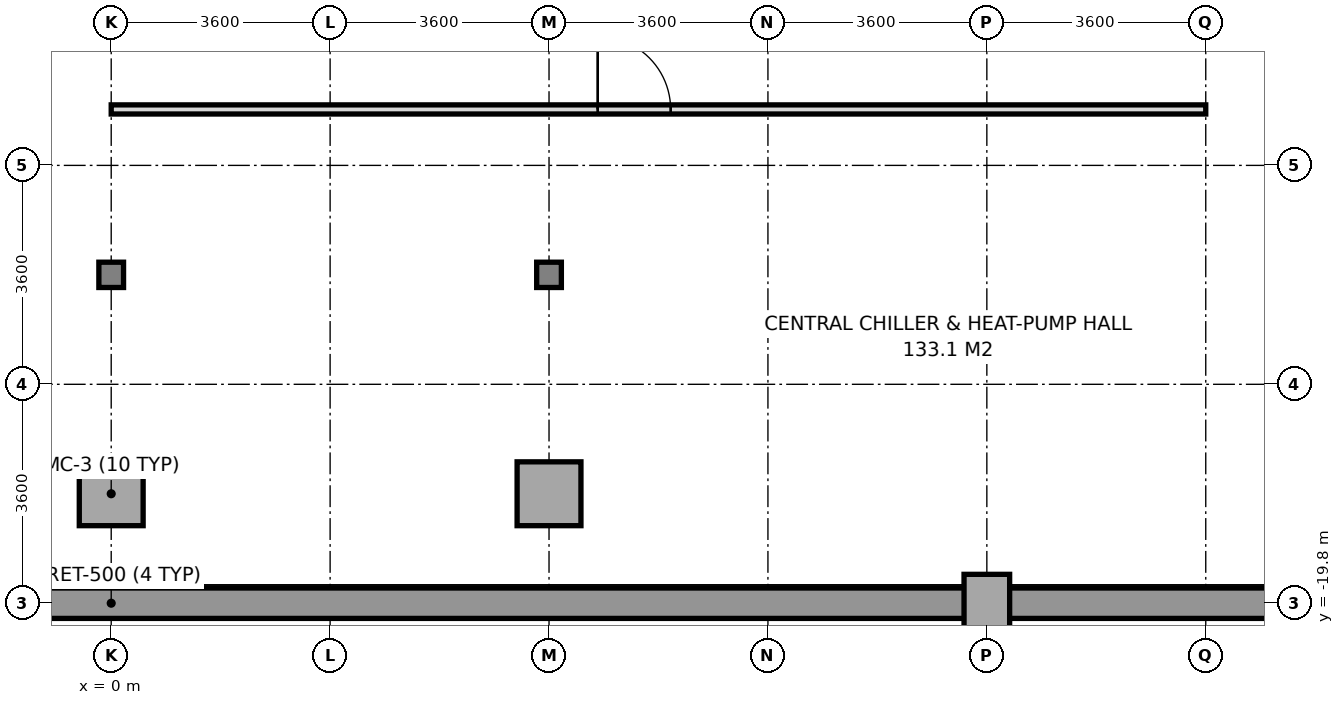
"""IFC4 building model, lengths in metres.
Left out: names, types, materials, properties, quantities, classifications, styles, units other than length and angle.
Written with IfcOpenShell. Run it as: python <this file> out.ifc"""

import sys

from ifc_helpers import new_model, si_unit, direction, frame, frame_2d, origin, origin_2d, place, context, subcontext, project, spatial, rectangle, i_section, extrude, source, transform, mapped, element, fill, save


model = new_model("IFC4")
c1 = context("Model", 3, precision=1e-05, world=origin(), true_north=direction((0.0, 1.0)))
c2 = subcontext(c1, "Body", "Model", "MODEL_VIEW")
j1 = project(units=[si_unit("LENGTHUNIT", "METRE"), si_unit("PLANEANGLEUNIT", "RADIAN")], contexts=[c1])
p1 = place(None, origin())
s1 = spatial("IfcSite", under=j1, at=p1, CompositionType="ELEMENT")
p2 = place(p1, origin())
s2 = spatial("IfcBuilding", under=s1, at=p2, CompositionType="ELEMENT")
p3 = place(p2, frame((0.0, 0.0, -8.4)))
s3 = spatial("IfcBuildingStorey", under=s2, at=p3, CompositionType="ELEMENT", Elevation=-8.4)
m1 = source(origin(), c2, "Body", "SweptSolid", [
    extrude(rectangle(XDim=1.05, YDim=1.05, at=origin_2d()), origin(), (0.0, 0.0, 1.0), 4.12),
])
p4 = place(p3, frame((0.0, -18.0, -0.2), z_axis=(0.0, 0.0, 1.0), x_axis=(1.0, 0.0, 0.0)))
e1 = element("IfcColumn", 1, at=p4, inside=s3, PredefinedType="COLUMN", context=c2, shape_type="MappedRepresentation", body=[
    mapped(m1, transform((0.0, 0.0, 0.0), x_axis=(1.0, 0.0, 0.0), y_axis=(0.0, 1.0, 0.0), z_axis=(0.0, 0.0, 1.0), scale=1.0)),
])
m2 = source(origin(), c2, "Body", "SweptSolid", [
    extrude(i_section(OverallWidth=0.406, OverallDepth=0.416, WebThickness=0.024, FlangeThickness=0.039, at=origin_2d()), origin(), (0.0, 0.0, 1.0), 4.12),
])
p5 = place(p3, frame((0.0, -14.4, -0.2), z_axis=(0.0, 0.0, 1.0), x_axis=(1.0, 0.0, 0.0)))
e2 = element("IfcColumn", 2, at=p5, inside=s3, PredefinedType="COLUMN", context=c2, shape_type="MappedRepresentation", body=[
    mapped(m2, transform((0.0, 0.0, 0.0), x_axis=(1.0, 0.0, 0.0), y_axis=(0.0, 1.0, 0.0), z_axis=(0.0, 0.0, 1.0), scale=1.0)),
])
p6 = place(p3, frame((7.2, -18.0, -0.2), z_axis=(0.0, 0.0, 1.0), x_axis=(1.0, 0.0, 0.0)))
e3 = element("IfcColumn", 3, at=p6, inside=s3, PredefinedType="COLUMN", context=c2, shape_type="MappedRepresentation", body=[
    mapped(m1, transform((0.0, 0.0, 0.0), x_axis=(1.0, 0.0, 0.0), y_axis=(0.0, 1.0, 0.0), z_axis=(0.0, 0.0, 1.0), scale=1.0)),
])
p7 = place(p3, frame((7.2, -14.4, -0.2), z_axis=(0.0, 0.0, 1.0), x_axis=(1.0, 0.0, 0.0)))
e4 = element("IfcColumn", 4, at=p7, inside=s3, PredefinedType="COLUMN", context=c2, shape_type="MappedRepresentation", body=[
    mapped(m2, transform((0.0, 0.0, 0.0), x_axis=(1.0, 0.0, 0.0), y_axis=(0.0, 1.0, 0.0), z_axis=(0.0, 0.0, 1.0), scale=1.0)),
])
m3 = source(origin(), c2, "Body", "SweptSolid", [
    extrude(rectangle(XDim=0.75, YDim=0.95, at=origin_2d()), origin(), (0.0, 0.0, 1.0), 4.12),
])
p8 = place(p3, frame((14.4, -19.8, -0.2), z_axis=(0.0, 0.0, 1.0), x_axis=(1.0, 0.0, 0.0)))
e5 = element("IfcColumn", 5, at=p8, inside=s3, PredefinedType="COLUMN", context=c2, shape_type="MappedRepresentation", body=[
    mapped(m3, transform((0.0, 0.0, 0.0), x_axis=(1.0, 0.0, 0.0), y_axis=(0.0, 1.0, 0.0), z_axis=(0.0, 0.0, 1.0), scale=1.0)),
])
p9 = place(p3, frame((-32.4, -19.8, -0.2), z_axis=(0.0, 0.0, 1.0), x_axis=(1.0, 0.0, 0.0)))
e6 = element("IfcWall", 6, at=p9, inside=s3, PredefinedType="USERDEFINED", context=c2, shape_type="SweptSolid", body=[
    extrude(rectangle(XDim=64.8, YDim=0.5, at=frame_2d((32.4, 0.0))), origin(), (0.0, 0.0, 1.0), 4.12),
])
p10 = place(p3, frame((0.0, -11.68, 0.0), z_axis=(0.0, 0.0, 1.0), x_axis=(1.0, 0.0, 0.0)))
e7 = element("IfcWall", 7, at=p10, inside=s3, PredefinedType="PARTITIONING", context=c2, shape_type="SweptSolid", body=[
    extrude(rectangle(XDim=18.0, YDim=0.15, at=frame_2d((9.0, 0.0))), origin(), (0.0, 0.0, 1.0), 3.33),
])
p11 = place(p10, frame((8.0, 0.0, 0.0)))
e8 = element("IfcOpeningElement", 8, at=p11, cuts=e7, PredefinedType="OPENING", context=c2, shape_type="SweptSolid", body=[
    extrude(rectangle(XDim=1.2, YDim=2.2, at=frame_2d((0.6, 1.1))), frame((0.0, 0.085, 0.0), z_axis=(0.0, -1.0, 0.0), x_axis=(1.0, 0.0, 0.0)), (0.0, 0.0, 1.0), 0.17),
])
m4 = source(origin(), c2, "Body", "SweptSolid", [
    extrude(rectangle(XDim=1.2, YDim=2.2, at=frame_2d((0.6, 1.1))), frame((0.0, 0.025, 0.0), z_axis=(0.0, -1.0, 0.0), x_axis=(1.0, 0.0, 0.0)), (0.0, 0.0, 1.0), 0.05),
])
p12 = place(p11, origin())
e9 = element("IfcDoor", 9, at=p12, inside=s3, OperationType="SINGLE_SWING_LEFT", PredefinedType="DOOR", context=c2, shape_type="MappedRepresentation", body=[
    mapped(m4, transform((0.0, 0.0, 0.0), x_axis=(1.0, 0.0, 0.0), y_axis=(0.0, 1.0, 0.0), z_axis=(0.0, 0.0, 1.0), scale=1.0)),
])
fill(e8, e9)
save(model, sys.argv[1])
